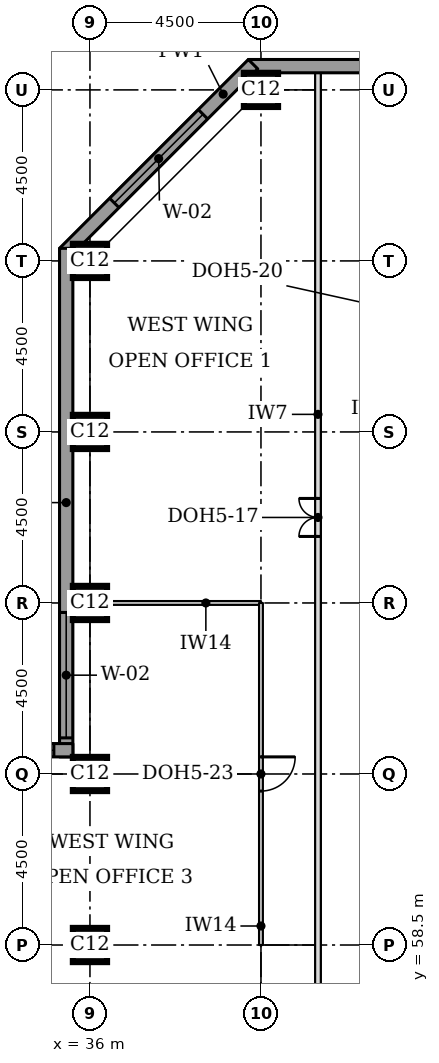
"""IFC4 building model, lengths in metres.
Left out: names, types, materials, properties, quantities, classifications, styles, units other than length and angle.
Written with IfcOpenShell. Run it as: python <this file> out.ifc"""

import sys

from ifc_helpers import new_model, si_unit, direction, frame, frame_2d, origin, origin_2d, place, context, subcontext, project, spatial, rectangle, extrude, element, fill, save


model = new_model("IFC4")
c1 = context("Model", 3, precision=1e-05, world=origin(), true_north=direction((0.0, 1.0)))
c2 = subcontext(c1, "Body", "Model", "MODEL_VIEW")
j1 = project(units=[si_unit("LENGTHUNIT", "METRE"), si_unit("PLANEANGLEUNIT", "RADIAN")], contexts=[c1])
p1 = place(None, origin())
s1 = spatial("IfcSite", under=j1, at=p1, CompositionType="ELEMENT")
p2 = place(p1, origin())
s2 = spatial("IfcBuilding", under=s1, at=p2, CompositionType="ELEMENT")
p3 = place(p2, frame((0.0, 0.0, 181.0)))
s3 = spatial("IfcBuildingStorey", under=s2, at=p3, CompositionType="ELEMENT", Elevation=181.0)
for number, where, z_axis, x_axis in (
    (1, (36.0, 58.5, 0.0), (0.0, 0.0, 1.0), (1.0, 0.0, 0.0)),
    (2, (36.0, 63.0, 0.0), (0.0, 0.0, 1.0), (1.0, 0.0, 0.0)),
    (3, (36.0, 67.5, 0.0), (0.0, 0.0, 1.0), (1.0, 0.0, 0.0)),
    (4, (36.0, 72.0, 0.0), (0.0, 0.0, 1.0), (1.0, 0.0, 0.0)),
    (5, (36.0, 76.5, 0.0), (0.0, 0.0, 1.0), (1.0, 0.0, 0.0)),
    (6, (40.5, 81.0, 0.0), (0.0, 0.0, 1.0), (1.0, 0.0, 0.0)),
):
    element("IfcColumn", number, at=place(p3, frame(where, z_axis=z_axis, x_axis=x_axis)), inside=s3, PredefinedType="COLUMN", context=c2, shape_type="SweptSolid", body=[
        extrude(rectangle(XDim=0.9, YDim=0.9, at=origin_2d()), origin(), (0.0, 0.0, 1.0), 3.7),
    ])
p4 = place(p3, frame((72.331, 81.625, 0.0), z_axis=(0.0, 0.0, 1.0), x_axis=(-1.0, 0.0, 0.0)))
e7 = element("IfcWall", 7, at=p4, inside=s3, PredefinedType="STANDARD", context=c2, shape_type="SweptSolid", body=[
    extrude(rectangle(XDim=32.163, YDim=0.35, at=frame_2d((16.081, 0.0))), origin(), (0.0, 0.0, 1.0), 3.525),
])
p5 = place(p4, frame((5.431, 0.0, 0.9)))
e8 = element("IfcOpeningElement", 8, at=p5, cuts=e7, PredefinedType="OPENING", context=c2, shape_type="SweptSolid", body=[
    extrude(rectangle(XDim=3.3, YDim=1.9, at=frame_2d((1.65, 0.95))), frame((0.0, 0.185, 0.0), z_axis=(0.0, -1.0, 0.0), x_axis=(1.0, 0.0, 0.0)), (0.0, 0.0, 1.0), 0.37),
])
p6 = place(p4, frame((9.931, 0.0, 0.9)))
e9 = element("IfcOpeningElement", 9, at=p6, cuts=e7, PredefinedType="OPENING", context=c2, shape_type="SweptSolid", body=[
    extrude(rectangle(XDim=3.3, YDim=1.9, at=frame_2d((1.65, 0.95))), frame((0.0, 0.185, 0.0), z_axis=(0.0, -1.0, 0.0), x_axis=(1.0, 0.0, 0.0)), (0.0, 0.0, 1.0), 0.37),
])
p7 = place(p4, frame((14.431, 0.0, 0.9)))
e10 = element("IfcOpeningElement", 10, at=p7, cuts=e7, PredefinedType="OPENING", context=c2, shape_type="SweptSolid", body=[
    extrude(rectangle(XDim=3.3, YDim=1.9, at=frame_2d((1.65, 0.95))), frame((0.0, 0.185, 0.0), z_axis=(0.0, -1.0, 0.0), x_axis=(1.0, 0.0, 0.0)), (0.0, 0.0, 1.0), 0.37),
])
p8 = place(p4, frame((18.931, 0.0, 0.9)))
e11 = element("IfcOpeningElement", 11, at=p8, cuts=e7, PredefinedType="OPENING", context=c2, shape_type="SweptSolid", body=[
    extrude(rectangle(XDim=3.3, YDim=1.9, at=frame_2d((1.65, 0.95))), frame((0.0, 0.185, 0.0), z_axis=(0.0, -1.0, 0.0), x_axis=(1.0, 0.0, 0.0)), (0.0, 0.0, 1.0), 0.37),
])
p9 = place(p4, frame((23.431, 0.0, 0.9)))
e12 = element("IfcOpeningElement", 12, at=p9, cuts=e7, PredefinedType="OPENING", context=c2, shape_type="SweptSolid", body=[
    extrude(rectangle(XDim=3.3, YDim=1.9, at=frame_2d((1.65, 0.95))), frame((0.0, 0.185, 0.0), z_axis=(0.0, -1.0, 0.0), x_axis=(1.0, 0.0, 0.0)), (0.0, 0.0, 1.0), 0.37),
])
p10 = place(p3, frame((40.292, 81.676, 0.0), z_axis=(0.0, 0.0, 1.0), x_axis=(-0.707106781187, -0.707106781187, 0.0)))
e13 = element("IfcWall", 13, at=p10, inside=s3, PredefinedType="STANDARD", context=c2, shape_type="SweptSolid", body=[
    extrude(rectangle(XDim=7.027, YDim=0.35, at=frame_2d((3.513, 0.0))), origin(), (0.0, 0.0, 1.0), 3.525),
])
p11 = place(p10, frame((1.863, 0.0, 0.9)))
e14 = element("IfcOpeningElement", 14, at=p11, cuts=e13, PredefinedType="OPENING", context=c2, shape_type="SweptSolid", body=[
    extrude(rectangle(XDim=3.3, YDim=1.9, at=frame_2d((1.65, 0.95))), frame((0.0, 0.185, 0.0), z_axis=(0.0, -1.0, 0.0), x_axis=(1.0, 0.0, 0.0)), (0.0, 0.0, 1.0), 0.37),
])
p12 = place(p3, frame((35.375, 76.831, 0.0), z_axis=(0.0, 0.0, 1.0), x_axis=(0.0, -1.0, 0.0)))
e15 = element("IfcWall", 15, at=p12, inside=s3, PredefinedType="STANDARD", context=c2, shape_type="SweptSolid", body=[
    extrude(rectangle(XDim=13.381, YDim=0.35, at=frame_2d((6.691, 0.0))), origin(), (0.0, 0.0, 1.0), 3.525),
])
p13 = place(p12, frame((9.581, 0.0, 0.9)))
e16 = element("IfcOpeningElement", 16, at=p13, cuts=e15, PredefinedType="OPENING", context=c2, shape_type="SweptSolid", body=[
    extrude(rectangle(XDim=3.3, YDim=1.9, at=frame_2d((1.65, 0.95))), frame((0.0, 0.185, 0.0), z_axis=(0.0, -1.0, 0.0), x_axis=(1.0, 0.0, 0.0)), (0.0, 0.0, 1.0), 0.37),
])
p14 = place(p3, frame((35.55, 63.625, 0.0), z_axis=(0.0, 0.0, 1.0), x_axis=(-1.0, 0.0, 0.0)))
e17 = element("IfcWall", 17, at=p14, inside=s3, PredefinedType="STANDARD", context=c2, shape_type="SweptSolid", body=[
    extrude(rectangle(XDim=17.881, YDim=0.35, at=frame_2d((8.941, 0.0))), origin(), (0.0, 0.0, 1.0), 3.525),
])
p15 = place(p14, frame((0.5, 0.0, 0.9)))
e18 = element("IfcOpeningElement", 18, at=p15, cuts=e17, PredefinedType="OPENING", context=c2, shape_type="SweptSolid", body=[
    extrude(rectangle(XDim=3.3, YDim=1.9, at=frame_2d((1.65, 0.95))), frame((0.0, 0.185, 0.0), z_axis=(0.0, -1.0, 0.0), x_axis=(1.0, 0.0, 0.0)), (0.0, 0.0, 1.0), 0.37),
])
p16 = place(p14, frame((9.15, 0.0, 0.9)))
e19 = element("IfcOpeningElement", 19, at=p16, cuts=e17, PredefinedType="OPENING", context=c2, shape_type="SweptSolid", body=[
    extrude(rectangle(XDim=3.3, YDim=1.9, at=frame_2d((1.65, 0.95))), frame((0.0, 0.185, 0.0), z_axis=(0.0, -1.0, 0.0), x_axis=(1.0, 0.0, 0.0)), (0.0, 0.0, 1.0), 0.37),
])
p17 = place(p3, frame((42.0, 57.075, 0.0), z_axis=(0.0, 0.0, 1.0), x_axis=(0.0, 1.0, 0.0)))
e20 = element("IfcWall", 20, at=p17, inside=s3, PredefinedType="PARTITIONING", context=c2, shape_type="SweptSolid", body=[
    extrude(rectangle(XDim=24.375, YDim=0.15, at=frame_2d((12.188, 0.0))), origin(), (0.0, 0.0, 1.0), 3.55),
])
p18 = place(p17, frame((12.175, 0.0, 0.0)))
e21 = element("IfcOpeningElement", 21, at=p18, cuts=e20, PredefinedType="OPENING", context=c2, shape_type="SweptSolid", body=[
    extrude(rectangle(XDim=1.0, YDim=2.1, at=frame_2d((0.5, 1.05))), frame((0.0, 0.085, 0.0), z_axis=(0.0, -1.0, 0.0), x_axis=(1.0, 0.0, 0.0)), (0.0, 0.0, 1.0), 0.17),
])
p19 = place(p3, frame((36.0, 67.5, 0.0), z_axis=(0.0, 0.0, 1.0), x_axis=(1.0, 0.0, 0.0)))
e22 = element("IfcWall", 22, at=p19, inside=s3, PredefinedType="PARTITIONING", context=c2, shape_type="SweptSolid", body=[
    extrude(rectangle(XDim=4.5, YDim=0.1, at=frame_2d((2.25, 0.0))), origin(), (0.0, 0.0, 1.0), 3.55),
])
p20 = place(p3, frame((40.5, 67.5, 0.0), z_axis=(0.0, 0.0, 1.0), x_axis=(0.0, -1.0, 0.0)))
e23 = element("IfcWall", 23, at=p20, inside=s3, PredefinedType="PARTITIONING", context=c2, shape_type="SweptSolid", body=[
    extrude(rectangle(XDim=9.0, YDim=0.1, at=frame_2d((4.5, 0.0))), origin(), (0.0, 0.0, 1.0), 3.55),
])
p21 = place(p20, frame((4.05, 0.0, 0.0)))
e24 = element("IfcOpeningElement", 24, at=p21, cuts=e23, PredefinedType="OPENING", context=c2, shape_type="SweptSolid", body=[
    extrude(rectangle(XDim=0.9, YDim=2.1, at=frame_2d((0.45, 1.05))), frame((0.0, 0.06, 0.0), z_axis=(0.0, -1.0, 0.0), x_axis=(1.0, 0.0, 0.0)), (0.0, 0.0, 1.0), 0.12),
])
p22 = place(p11, origin())
e25 = element("IfcWindow", 25, at=p22, inside=s3, PartitioningType="SINGLE_PANEL", PredefinedType="WINDOW", context=c2, shape_type="SweptSolid", body=[
    extrude(rectangle(XDim=3.3, YDim=1.9, at=frame_2d((1.65, 0.95))), frame((0.0, 0.085, 0.0), z_axis=(0.0, -1.0, 0.0), x_axis=(1.0, 0.0, 0.0)), (0.0, 0.0, 1.0), 0.06),
])
fill(e14, e25)
p23 = place(p13, origin())
e26 = element("IfcWindow", 26, at=p23, inside=s3, PartitioningType="SINGLE_PANEL", PredefinedType="WINDOW", context=c2, shape_type="SweptSolid", body=[
    extrude(rectangle(XDim=3.3, YDim=1.9, at=frame_2d((1.65, 0.95))), frame((0.0, 0.085, 0.0), z_axis=(0.0, -1.0, 0.0), x_axis=(1.0, 0.0, 0.0)), (0.0, 0.0, 1.0), 0.06),
])
fill(e16, e26)
p24 = place(p15, origin())
e27 = element("IfcWindow", 27, at=p24, inside=s3, PartitioningType="SINGLE_PANEL", PredefinedType="WINDOW", context=c2, shape_type="SweptSolid", body=[
    extrude(rectangle(XDim=3.3, YDim=1.9, at=frame_2d((1.65, 0.95))), frame((0.0, 0.085, 0.0), z_axis=(0.0, -1.0, 0.0), x_axis=(1.0, 0.0, 0.0)), (0.0, 0.0, 1.0), 0.06),
])
fill(e18, e27)
p25 = place(p18, origin())
e28 = element("IfcDoor", 28, at=p25, inside=s3, OperationType="DOUBLE_DOOR_SINGLE_SWING", PredefinedType="DOOR", context=c2, shape_type="SweptSolid", body=[
    extrude(rectangle(XDim=1.0, YDim=2.1, at=frame_2d((0.5, 1.05))), frame((0.0, 0.025, 0.0), z_axis=(0.0, -1.0, 0.0), x_axis=(1.0, 0.0, 0.0)), (0.0, 0.0, 1.0), 0.05),
])
fill(e21, e28)
p26 = place(p21, origin())
e29 = element("IfcDoor", 29, at=p26, inside=s3, OperationType="SINGLE_SWING_LEFT", PredefinedType="DOOR", context=c2, shape_type="SweptSolid", body=[
    extrude(rectangle(XDim=0.9, YDim=2.1, at=frame_2d((0.45, 1.05))), frame((0.0, 0.025, 0.0), z_axis=(0.0, -1.0, 0.0), x_axis=(1.0, 0.0, 0.0)), (0.0, 0.0, 1.0), 0.05),
])
fill(e24, e29)
save(model, sys.argv[1])
